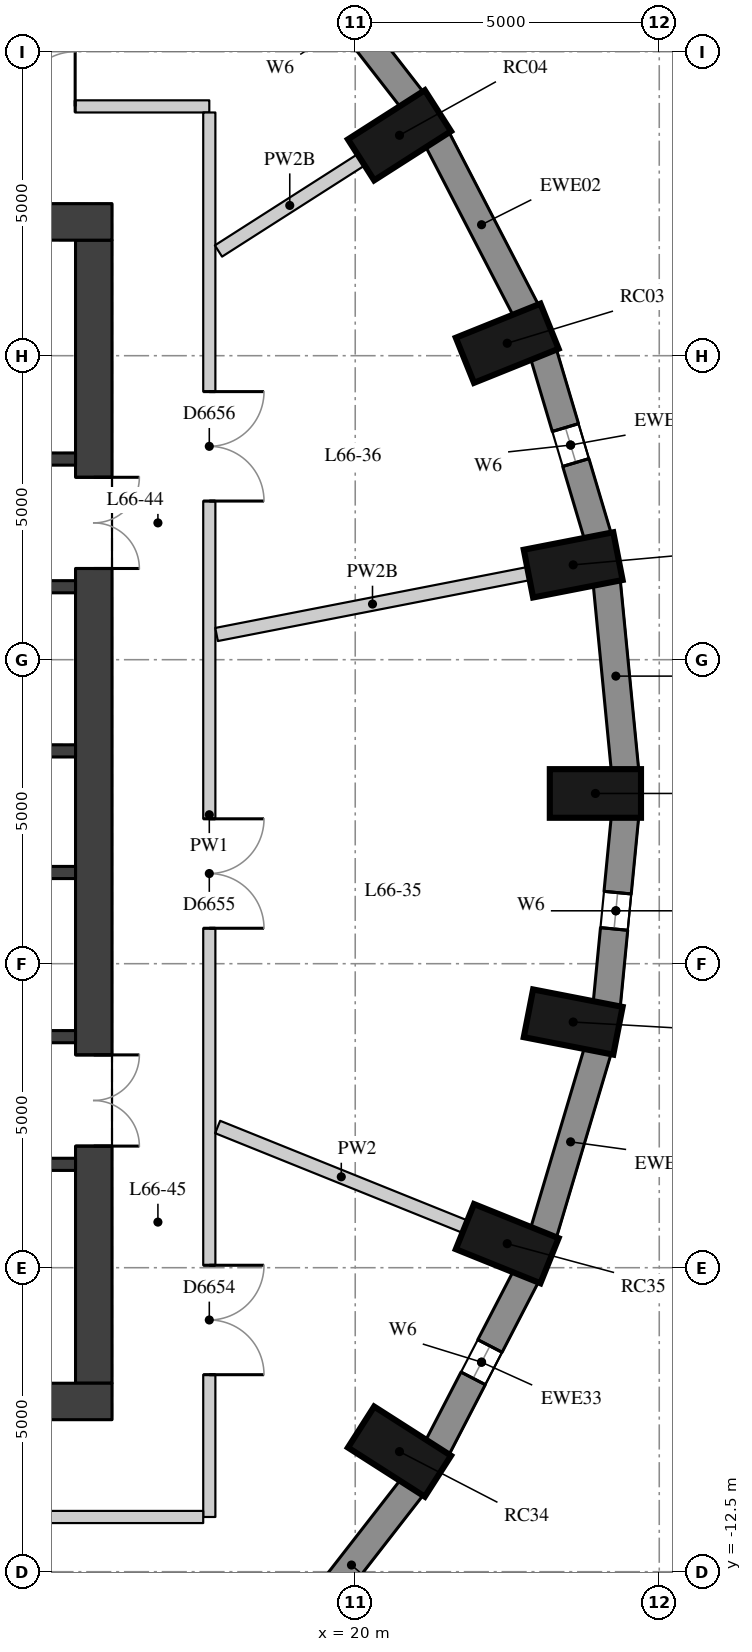
"""IFC4 building model, lengths in metres.
Left out: names, types, materials, properties, quantities, classifications, styles, units other than length and angle.
Written with IfcOpenShell. Run it as: python <this file> out.ifc"""

import sys

from ifc_helpers import new_model, si_unit, direction, frame, frame_2d, origin, origin_2d, place, context, subcontext, project, spatial, rectangle, extrude, element, fill, save


model = new_model("IFC4")
c1 = context("Model", 3, precision=1e-05, world=origin(), true_north=direction((0.0, 1.0)))
c2 = subcontext(c1, "Body", "Model", "MODEL_VIEW")
j1 = project(units=[si_unit("LENGTHUNIT", "METRE"), si_unit("PLANEANGLEUNIT", "RADIAN")], contexts=[c1])
p1 = place(None, origin())
s1 = spatial("IfcSite", under=j1, at=p1, CompositionType="ELEMENT")
p2 = place(p1, origin())
s2 = spatial("IfcBuilding", under=s1, at=p2, CompositionType="ELEMENT")
p3 = place(p2, frame((0.0, 0.0, 233.3)))
s3 = spatial("IfcBuildingStorey", under=s2, at=p3, CompositionType="ELEMENT", Elevation=233.3)
for number, where, z_axis, x_axis in (
    (1, (23.95, 0.3, 0.0), (0.0, 0.0, 1.0), (1.0, 0.0, 0.0)),
    (2, (23.585, 4.06, 0.0), (0.0, 0.0, 1.0), (0.981, 0.192, 0.0)),
    (3, (22.5, 7.705, 0.0), (0.0, 0.0, 1.0), (0.928, 0.374, 0.0)),
    (4, (20.728, 11.125, 0.0), (0.0, 0.0, 1.0), (0.843, 0.539, 0.0)),
    (5, (20.728, -10.525, 0.0), (0.0, 0.0, 1.0), (0.843, -0.539, 0.0)),
    (6, (22.5, -7.105, 0.0), (0.0, 0.0, 1.0), (0.928, -0.374, 0.0)),
    (7, (23.585, -3.459, 0.0), (0.0, 0.0, 1.0), (0.981, -0.192, 0.0)),
):
    element("IfcColumn", number, at=place(p3, frame(where, z_axis=z_axis, x_axis=x_axis)), inside=s3, PredefinedType="COLUMN", context=c2, shape_type="SweptSolid", body=[
        extrude(rectangle(XDim=1.5, YDim=0.8, at=origin_2d()), origin(), (0.0, 0.0, 1.0), 3.3),
    ])
p4 = place(p3, frame((24.437, 0.68, 0.0), z_axis=(0.0, 0.0, 1.0), x_axis=(-0.096740086873, 0.995309678237, 0.0)))
e8 = element("IfcWall", 8, at=p4, inside=s3, PredefinedType="SOLIDWALL", context=c2, shape_type="SweptSolid", body=[
    extrude(rectangle(XDim=3.114, YDim=0.45, at=frame_2d((1.557, 0.0))), origin(), (0.0, 0.0, 1.0), 3.02),
])
p5 = place(p3, frame((23.99, 4.526, 0.0), z_axis=(0.0, 0.0, 1.0), x_axis=(-0.285263800865, 0.958449040855, 0.0)))
e9 = element("IfcWall", 9, at=p5, inside=s3, PredefinedType="SOLIDWALL", context=c2, shape_type="SweptSolid", body=[
    extrude(rectangle(XDim=3.139, YDim=0.45, at=frame_2d((1.57, 0.0))), origin(), (0.0, 0.0, 1.0), 3.02),
])
p6 = place(p5, frame((1.27, 0.0, 0.4)))
e10 = element("IfcOpeningElement", 10, at=p6, cuts=e9, PredefinedType="OPENING", context=c2, shape_type="SweptSolid", body=[
    extrude(rectangle(XDim=0.6, YDim=1.75, at=frame_2d((0.3, 0.875))), frame((0.0, 0.235, 0.0), z_axis=(0.0, -1.0, 0.0), x_axis=(1.0, 0.0, 0.0)), (0.0, 0.0, 1.0), 0.47),
])
p7 = place(p3, frame((22.81, 8.24, 0.0), z_axis=(0.0, 0.0, 1.0), x_axis=(-0.459889857669, 0.887975967475, 0.0)))
e11 = element("IfcWall", 11, at=p7, inside=s3, PredefinedType="SOLIDWALL", context=c2, shape_type="SweptSolid", body=[
    extrude(rectangle(XDim=3.186, YDim=0.45, at=frame_2d((1.593, 0.0))), origin(), (0.0, 0.0, 1.0), 3.02),
])
p8 = place(p3, frame((20.935, 11.708, 0.0), z_axis=(0.0, 0.0, 1.0), x_axis=(-0.613862536705, 0.789412937587, 0.0)))
e12 = element("IfcWall", 12, at=p8, inside=s3, PredefinedType="SOLIDWALL", context=c2, shape_type="SweptSolid", body=[
    extrude(rectangle(XDim=3.247, YDim=0.45, at=frame_2d((1.624, 0.0))), origin(), (0.0, 0.0, 1.0), 3.02),
])
p9 = place(p8, frame((1.324, 0.0, 0.4)))
e13 = element("IfcOpeningElement", 13, at=p9, cuts=e12, PredefinedType="OPENING", context=c2, shape_type="SweptSolid", body=[
    extrude(rectangle(XDim=0.6, YDim=1.75, at=frame_2d((0.3, 0.875))), frame((0.0, 0.235, 0.0), z_axis=(0.0, -1.0, 0.0), x_axis=(1.0, 0.0, 0.0)), (0.0, 0.0, 1.0), 0.47),
])
p10 = place(p3, frame((18.942, -13.672, 0.0), z_axis=(0.0, 0.0, 1.0), x_axis=(0.613898970825, 0.789384604372, 0.0)))
e14 = element("IfcWall", 14, at=p10, inside=s3, PredefinedType="SOLIDWALL", context=c2, shape_type="SweptSolid", body=[
    extrude(rectangle(XDim=3.247, YDim=0.45, at=frame_2d((1.624, 0.0))), origin(), (0.0, 0.0, 1.0), 3.02),
])
p11 = place(p3, frame((21.345, -10.468, 0.0), z_axis=(0.0, 0.0, 1.0), x_axis=(0.459921155255, 0.887959757505, 0.0)))
e15 = element("IfcWall", 15, at=p11, inside=s3, PredefinedType="SOLIDWALL", context=c2, shape_type="SweptSolid", body=[
    extrude(rectangle(XDim=3.186, YDim=0.45, at=frame_2d((1.593, 0.0))), origin(), (0.0, 0.0, 1.0), 3.02),
])
p12 = place(p11, frame((1.293, 0.0, 0.4)))
e16 = element("IfcOpeningElement", 16, at=p12, cuts=e15, PredefinedType="OPENING", context=c2, shape_type="SweptSolid", body=[
    extrude(rectangle(XDim=0.6, YDim=1.75, at=frame_2d((0.3, 0.875))), frame((0.0, 0.235, 0.0), z_axis=(0.0, -1.0, 0.0), x_axis=(1.0, 0.0, 0.0)), (0.0, 0.0, 1.0), 0.47),
])
p13 = place(p3, frame((23.094, -6.935, 0.0), z_axis=(0.0, 0.0, 1.0), x_axis=(0.285263800865, 0.958449040855, 0.0)))
e17 = element("IfcWall", 17, at=p13, inside=s3, PredefinedType="SOLIDWALL", context=c2, shape_type="SweptSolid", body=[
    extrude(rectangle(XDim=3.139, YDim=0.45, at=frame_2d((1.57, 0.0))), origin(), (0.0, 0.0, 1.0), 3.02),
])
p14 = place(p3, frame((24.136, -3.18, 0.0), z_axis=(0.0, 0.0, 1.0), x_axis=(0.09673253904, 0.995310411827, 0.0)))
e18 = element("IfcWall", 18, at=p14, inside=s3, PredefinedType="SOLIDWALL", context=c2, shape_type="SweptSolid", body=[
    extrude(rectangle(XDim=3.115, YDim=0.45, at=frame_2d((1.557, 0.0))), origin(), (0.0, 0.0, 1.0), 3.02),
])
p15 = place(p14, frame((1.257, 0.0, 0.4)))
e19 = element("IfcOpeningElement", 19, at=p15, cuts=e18, PredefinedType="OPENING", context=c2, shape_type="SweptSolid", body=[
    extrude(rectangle(XDim=0.6, YDim=1.75, at=frame_2d((0.3, 0.875))), frame((0.0, 0.235, 0.0), z_axis=(0.0, -1.0, 0.0), x_axis=(1.0, 0.0, 0.0)), (0.0, 0.0, 1.0), 0.47),
])
p16 = place(p3, frame((15.7, -9.4, 0.0), z_axis=(0.0, 0.0, 1.0), x_axis=(0.0, 1.0, 0.0)))
e20 = element("IfcWall", 20, at=p16, inside=s3, PredefinedType="SHEAR", context=c2, shape_type="SweptSolid", body=[
    extrude(rectangle(XDim=18.8, YDim=0.6, at=frame_2d((9.4, 0.0))), origin(), (0.0, 0.0, 1.0), 3.02),
])
p17 = place(p16, frame((13.4, 0.0, 0.0)))
e21 = element("IfcOpeningElement", 21, at=p17, cuts=e20, PredefinedType="OPENING", context=c2, shape_type="SweptSolid", body=[
    extrude(rectangle(XDim=1.5, YDim=2.1, at=frame_2d((0.75, 1.05))), frame((0.0, 0.31, 0.0), z_axis=(0.0, -1.0, 0.0), x_axis=(1.0, 0.0, 0.0)), (0.0, 0.0, 1.0), 0.62),
])
p18 = place(p16, frame((3.9, 0.0, 0.0)))
e22 = element("IfcOpeningElement", 22, at=p18, cuts=e20, PredefinedType="OPENING", context=c2, shape_type="SweptSolid", body=[
    extrude(rectangle(XDim=1.5, YDim=2.1, at=frame_2d((0.75, 1.05))), frame((0.0, 0.31, 0.0), z_axis=(0.0, -1.0, 0.0), x_axis=(1.0, 0.0, 0.0)), (0.0, 0.0, 1.0), 0.62),
])
for number, where, z_axis, x_axis in (
    (23, (4.0, 9.7, 0.0), (0.0, 0.0, 1.0), (1.0, 0.0, 0.0)),
    (24, (4.0, -9.7, 0.0), (0.0, 0.0, 1.0), (1.0, 0.0, 0.0)),
):
    element("IfcWall", number, at=place(p3, frame(where, z_axis=z_axis, x_axis=x_axis)), inside=s3, PredefinedType="SHEAR", context=c2, shape_type="SweptSolid", body=[
        extrude(rectangle(XDim=12.0, YDim=0.6, at=frame_2d((6.0, 0.0))), origin(), (0.0, 0.0, 1.0), 3.02),
    ])
p19 = place(p3, frame((4.6, 5.8, 0.0), z_axis=(0.0, 0.0, 1.0), x_axis=(1.0, 0.0, 0.0)))
e25 = element("IfcWall", 25, at=p19, inside=s3, PredefinedType="SHEAR", context=c2, shape_type="SweptSolid", body=[
    extrude(rectangle(XDim=10.8, YDim=0.2, at=frame_2d((5.4, 0.0))), origin(), (0.0, 0.0, 1.0), 3.02),
])
p20 = place(p19, frame((7.05, 0.0, 0.0)))
e26 = element("IfcOpeningElement", 26, at=p20, cuts=e25, PredefinedType="OPENING", context=c2, shape_type="SweptSolid", body=[
    extrude(rectangle(XDim=1.1, YDim=2.1, at=frame_2d((0.55, 1.05))), frame((0.0, 0.11, 0.0), z_axis=(0.0, -1.0, 0.0), x_axis=(1.0, 0.0, 0.0)), (0.0, 0.0, 1.0), 0.22),
])
p21 = place(p19, frame((9.05, 0.0, 0.0)))
e27 = element("IfcOpeningElement", 27, at=p21, cuts=e25, PredefinedType="OPENING", context=c2, shape_type="SweptSolid", body=[
    extrude(rectangle(XDim=1.1, YDim=2.1, at=frame_2d((0.55, 1.05))), frame((0.0, 0.11, 0.0), z_axis=(0.0, -1.0, 0.0), x_axis=(1.0, 0.0, 0.0)), (0.0, 0.0, 1.0), 0.22),
])
p22 = place(p3, frame((4.6, 3.7, 0.0), z_axis=(0.0, 0.0, 1.0), x_axis=(1.0, 0.0, 0.0)))
e28 = element("IfcWall", 28, at=p22, inside=s3, PredefinedType="SHEAR", context=c2, shape_type="SweptSolid", body=[
    extrude(rectangle(XDim=10.8, YDim=0.2, at=frame_2d((5.4, 0.0))), origin(), (0.0, 0.0, 1.0), 3.02),
])
p23 = place(p22, frame((6.6, 0.0, 0.0)))
e29 = element("IfcOpeningElement", 29, at=p23, cuts=e28, PredefinedType="OPENING", context=c2, shape_type="SweptSolid", body=[
    extrude(rectangle(XDim=1.1, YDim=2.1, at=frame_2d((0.55, 1.05))), frame((0.0, 0.11, 0.0), z_axis=(0.0, -1.0, 0.0), x_axis=(1.0, 0.0, 0.0)), (0.0, 0.0, 1.0), 0.22),
])
p24 = place(p22, frame((8.9, 0.0, 0.0)))
e30 = element("IfcOpeningElement", 30, at=p24, cuts=e28, PredefinedType="OPENING", context=c2, shape_type="SweptSolid", body=[
    extrude(rectangle(XDim=1.1, YDim=2.1, at=frame_2d((0.55, 1.05))), frame((0.0, 0.11, 0.0), z_axis=(0.0, -1.0, 0.0), x_axis=(1.0, 0.0, 0.0)), (0.0, 0.0, 1.0), 0.22),
])
for number, where, z_axis, x_axis in (
    (31, (4.6, 1.0, 0.0), (0.0, 0.0, 1.0), (1.0, 0.0, 0.0)),
    (32, (4.6, -1.0, 0.0), (0.0, 0.0, 1.0), (1.0, 0.0, 0.0)),
):
    element("IfcWall", number, at=place(p3, frame(where, z_axis=z_axis, x_axis=x_axis)), inside=s3, PredefinedType="SHEAR", context=c2, shape_type="SweptSolid", body=[
        extrude(rectangle(XDim=10.8, YDim=0.2, at=frame_2d((5.4, 0.0))), origin(), (0.0, 0.0, 1.0), 3.02),
    ])
p25 = place(p3, frame((4.6, -3.7, 0.0), z_axis=(0.0, 0.0, 1.0), x_axis=(1.0, 0.0, 0.0)))
e33 = element("IfcWall", 33, at=p25, inside=s3, PredefinedType="SHEAR", context=c2, shape_type="SweptSolid", body=[
    extrude(rectangle(XDim=10.8, YDim=0.2, at=frame_2d((5.4, 0.0))), origin(), (0.0, 0.0, 1.0), 3.02),
])
p26 = place(p25, frame((6.6, 0.0, 0.0)))
e34 = element("IfcOpeningElement", 34, at=p26, cuts=e33, PredefinedType="OPENING", context=c2, shape_type="SweptSolid", body=[
    extrude(rectangle(XDim=1.1, YDim=2.1, at=frame_2d((0.55, 1.05))), frame((0.0, 0.11, 0.0), z_axis=(0.0, -1.0, 0.0), x_axis=(1.0, 0.0, 0.0)), (0.0, 0.0, 1.0), 0.22),
])
p27 = place(p25, frame((8.9, 0.0, 0.0)))
e35 = element("IfcOpeningElement", 35, at=p27, cuts=e33, PredefinedType="OPENING", context=c2, shape_type="SweptSolid", body=[
    extrude(rectangle(XDim=1.1, YDim=2.1, at=frame_2d((0.55, 1.05))), frame((0.0, 0.11, 0.0), z_axis=(0.0, -1.0, 0.0), x_axis=(1.0, 0.0, 0.0)), (0.0, 0.0, 1.0), 0.22),
])
p28 = place(p3, frame((4.6, -5.8, 0.0), z_axis=(0.0, 0.0, 1.0), x_axis=(1.0, 0.0, 0.0)))
e36 = element("IfcWall", 36, at=p28, inside=s3, PredefinedType="SHEAR", context=c2, shape_type="SweptSolid", body=[
    extrude(rectangle(XDim=10.8, YDim=0.2, at=frame_2d((5.4, 0.0))), origin(), (0.0, 0.0, 1.0), 3.02),
])
p29 = place(p3, frame((6.045, 11.6, 0.0), z_axis=(0.0, 0.0, 1.0), x_axis=(1.0, 0.0, 0.0)))
e37 = element("IfcWall", 37, at=p29, inside=s3, PredefinedType="PARTITIONING", context=c2, shape_type="SweptSolid", body=[
    extrude(rectangle(XDim=11.555, YDim=0.2, at=frame_2d((5.777, 0.0))), origin(), (0.0, 0.0, 1.0), 3.02),
])
p30 = place(p29, frame((1.461, 0.0, 0.0)))
e38 = element("IfcOpeningElement", 38, at=p30, cuts=e37, PredefinedType="OPENING", context=c2, shape_type="SweptSolid", body=[
    extrude(rectangle(XDim=1.1, YDim=2.1, at=frame_2d((0.55, 1.05))), frame((0.0, 0.11, 0.0), z_axis=(0.0, -1.0, 0.0), x_axis=(1.0, 0.0, 0.0)), (0.0, 0.0, 1.0), 0.22),
])
p31 = place(p29, frame((7.549, 0.0, 0.0)))
e39 = element("IfcOpeningElement", 39, at=p31, cuts=e37, PredefinedType="OPENING", context=c2, shape_type="SweptSolid", body=[
    extrude(rectangle(XDim=1.8, YDim=2.1, at=frame_2d((0.9, 1.05))), frame((0.0, 0.11, 0.0), z_axis=(0.0, -1.0, 0.0), x_axis=(1.0, 0.0, 0.0)), (0.0, 0.0, 1.0), 0.22),
])
p32 = place(p3, frame((17.6, 11.5, 0.0), z_axis=(0.0, 0.0, 1.0), x_axis=(0.0, -1.0, 0.0)))
e40 = element("IfcWall", 40, at=p32, inside=s3, PredefinedType="PARTITIONING", context=c2, shape_type="SweptSolid", body=[
    extrude(rectangle(XDim=23.1, YDim=0.2, at=frame_2d((11.55, 0.0))), origin(), (0.0, 0.0, 1.0), 3.02),
])
p33 = place(p32, frame((18.96, 0.0, 0.0)))
e41 = element("IfcOpeningElement", 41, at=p33, cuts=e40, PredefinedType="OPENING", context=c2, shape_type="SweptSolid", body=[
    extrude(rectangle(XDim=1.8, YDim=2.1, at=frame_2d((0.9, 1.05))), frame((0.0, 0.11, 0.0), z_axis=(0.0, -1.0, 0.0), x_axis=(1.0, 0.0, 0.0)), (0.0, 0.0, 1.0), 0.22),
])
p34 = place(p32, frame((11.617, 0.0, 0.0)))
e42 = element("IfcOpeningElement", 42, at=p34, cuts=e40, PredefinedType="OPENING", context=c2, shape_type="SweptSolid", body=[
    extrude(rectangle(XDim=1.8, YDim=2.1, at=frame_2d((0.9, 1.05))), frame((0.0, 0.11, 0.0), z_axis=(0.0, -1.0, 0.0), x_axis=(1.0, 0.0, 0.0)), (0.0, 0.0, 1.0), 0.22),
])
p35 = place(p32, frame((4.591, 0.0, 0.0)))
e43 = element("IfcOpeningElement", 43, at=p35, cuts=e40, PredefinedType="OPENING", context=c2, shape_type="SweptSolid", body=[
    extrude(rectangle(XDim=1.8, YDim=2.1, at=frame_2d((0.9, 1.05))), frame((0.0, 0.11, 0.0), z_axis=(0.0, -1.0, 0.0), x_axis=(1.0, 0.0, 0.0)), (0.0, 0.0, 1.0), 0.22),
])
p36 = place(p3, frame((17.5, -11.6, 0.0), z_axis=(0.0, 0.0, 1.0), x_axis=(-1.0, 0.0, 0.0)))
e44 = element("IfcWall", 44, at=p36, inside=s3, PredefinedType="PARTITIONING", context=c2, shape_type="SweptSolid", body=[
    extrude(rectangle(XDim=10.562, YDim=0.2, at=frame_2d((5.281, 0.0))), origin(), (0.0, 0.0, 1.0), 3.02),
])
p37 = place(p3, frame((22.849, 3.916, 0.0), z_axis=(0.0, 0.0, 1.0), x_axis=(-0.981474096155, -0.191594881394, 0.0)))
e45 = element("IfcWall", 45, at=p37, inside=s3, PredefinedType="PARTITIONING", context=c2, shape_type="SweptSolid", body=[
    extrude(rectangle(XDim=5.226, YDim=0.22, at=frame_2d((2.613, 0.0))), origin(), (0.0, 0.0, 1.0), 2.57),
])
p38 = place(p3, frame((20.096, 10.721, 0.0), z_axis=(0.0, 0.0, 1.0), x_axis=(-0.842583486412, -0.538565751256, 0.0)))
e46 = element("IfcWall", 46, at=p38, inside=s3, PredefinedType="PARTITIONING", context=c2, shape_type="SweptSolid", body=[
    extrude(rectangle(XDim=2.783, YDim=0.22, at=frame_2d((1.392, 0.0))), origin(), (0.0, 0.0, 1.0), 2.57),
])
p39 = place(p3, frame((21.804, -6.824, 0.0), z_axis=(0.0, 0.0, 1.0), x_axis=(-0.927528978592, 0.373751245981, 0.0)))
e47 = element("IfcWall", 47, at=p39, inside=s3, PredefinedType="PARTITIONING", context=c2, shape_type="SweptSolid", body=[
    extrude(rectangle(XDim=4.384, YDim=0.22, at=frame_2d((2.192, 0.0))), origin(), (0.0, 0.0, 1.0), 3.02),
])
p40 = place(p6, origin())
e48 = element("IfcWindow", 48, at=p40, inside=s3, PartitioningType="SINGLE_PANEL", PredefinedType="WINDOW", context=c2, shape_type="SweptSolid", body=[
    extrude(rectangle(XDim=0.6, YDim=1.75, at=frame_2d((0.3, 0.875))), frame((0.0, 0.035, 0.0), z_axis=(0.0, -1.0, 0.0), x_axis=(1.0, 0.0, 0.0)), (0.0, 0.0, 1.0), 0.06),
])
fill(e10, e48)
p41 = place(p12, origin())
e49 = element("IfcWindow", 49, at=p41, inside=s3, PartitioningType="SINGLE_PANEL", PredefinedType="WINDOW", context=c2, shape_type="SweptSolid", body=[
    extrude(rectangle(XDim=0.6, YDim=1.75, at=frame_2d((0.3, 0.875))), frame((0.0, 0.035, 0.0), z_axis=(0.0, -1.0, 0.0), x_axis=(1.0, 0.0, 0.0)), (0.0, 0.0, 1.0), 0.06),
])
fill(e16, e49)
p42 = place(p15, origin())
e50 = element("IfcWindow", 50, at=p42, inside=s3, PartitioningType="SINGLE_PANEL", PredefinedType="WINDOW", context=c2, shape_type="SweptSolid", body=[
    extrude(rectangle(XDim=0.6, YDim=1.75, at=frame_2d((0.3, 0.875))), frame((0.0, 0.035, 0.0), z_axis=(0.0, -1.0, 0.0), x_axis=(1.0, 0.0, 0.0)), (0.0, 0.0, 1.0), 0.06),
])
fill(e19, e50)
p43 = place(p17, origin())
e51 = element("IfcDoor", 51, at=p43, inside=s3, OperationType="DOUBLE_DOOR_SINGLE_SWING", PredefinedType="DOOR", context=c2, shape_type="SweptSolid", body=[
    extrude(rectangle(XDim=1.5, YDim=2.1, at=frame_2d((0.75, 1.05))), frame((0.0, 0.025, 0.0), z_axis=(0.0, -1.0, 0.0), x_axis=(1.0, 0.0, 0.0)), (0.0, 0.0, 1.0), 0.05),
])
fill(e21, e51)
p44 = place(p18, origin())
e52 = element("IfcDoor", 52, at=p44, inside=s3, OperationType="DOUBLE_DOOR_SINGLE_SWING", PredefinedType="DOOR", context=c2, shape_type="SweptSolid", body=[
    extrude(rectangle(XDim=1.5, YDim=2.1, at=frame_2d((0.75, 1.05))), frame((0.0, 0.025, 0.0), z_axis=(0.0, -1.0, 0.0), x_axis=(1.0, 0.0, 0.0)), (0.0, 0.0, 1.0), 0.05),
])
fill(e22, e52)
p45 = place(p33, origin())
e53 = element("IfcDoor", 53, at=p45, inside=s3, OperationType="DOUBLE_DOOR_SINGLE_SWING", PredefinedType="DOOR", context=c2, shape_type="SweptSolid", body=[
    extrude(rectangle(XDim=1.8, YDim=2.1, at=frame_2d((0.9, 1.05))), frame((0.0, 0.025, 0.0), z_axis=(0.0, -1.0, 0.0), x_axis=(1.0, 0.0, 0.0)), (0.0, 0.0, 1.0), 0.05),
])
fill(e41, e53)
p46 = place(p34, origin())
e54 = element("IfcDoor", 54, at=p46, inside=s3, OperationType="DOUBLE_DOOR_SINGLE_SWING", PredefinedType="DOOR", context=c2, shape_type="SweptSolid", body=[
    extrude(rectangle(XDim=1.8, YDim=2.1, at=frame_2d((0.9, 1.05))), frame((0.0, 0.025, 0.0), z_axis=(0.0, -1.0, 0.0), x_axis=(1.0, 0.0, 0.0)), (0.0, 0.0, 1.0), 0.05),
])
fill(e42, e54)
p47 = place(p35, origin())
e55 = element("IfcDoor", 55, at=p47, inside=s3, OperationType="DOUBLE_DOOR_SINGLE_SWING", PredefinedType="DOOR", context=c2, shape_type="SweptSolid", body=[
    extrude(rectangle(XDim=1.8, YDim=2.1, at=frame_2d((0.9, 1.05))), frame((0.0, 0.025, 0.0), z_axis=(0.0, -1.0, 0.0), x_axis=(1.0, 0.0, 0.0)), (0.0, 0.0, 1.0), 0.05),
])
fill(e43, e55)
p48 = place(p31, origin())
e56 = element("IfcDoor", 56, at=p48, inside=s3, OperationType="DOUBLE_DOOR_SINGLE_SWING", PredefinedType="DOOR", context=c2, shape_type="SweptSolid", body=[
    extrude(rectangle(XDim=1.8, YDim=2.1, at=frame_2d((0.9, 1.05))), frame((0.0, 0.025, 0.0), z_axis=(0.0, -1.0, 0.0), x_axis=(1.0, 0.0, 0.0)), (0.0, 0.0, 1.0), 0.05),
])
fill(e39, e56)
save(model, sys.argv[1])
